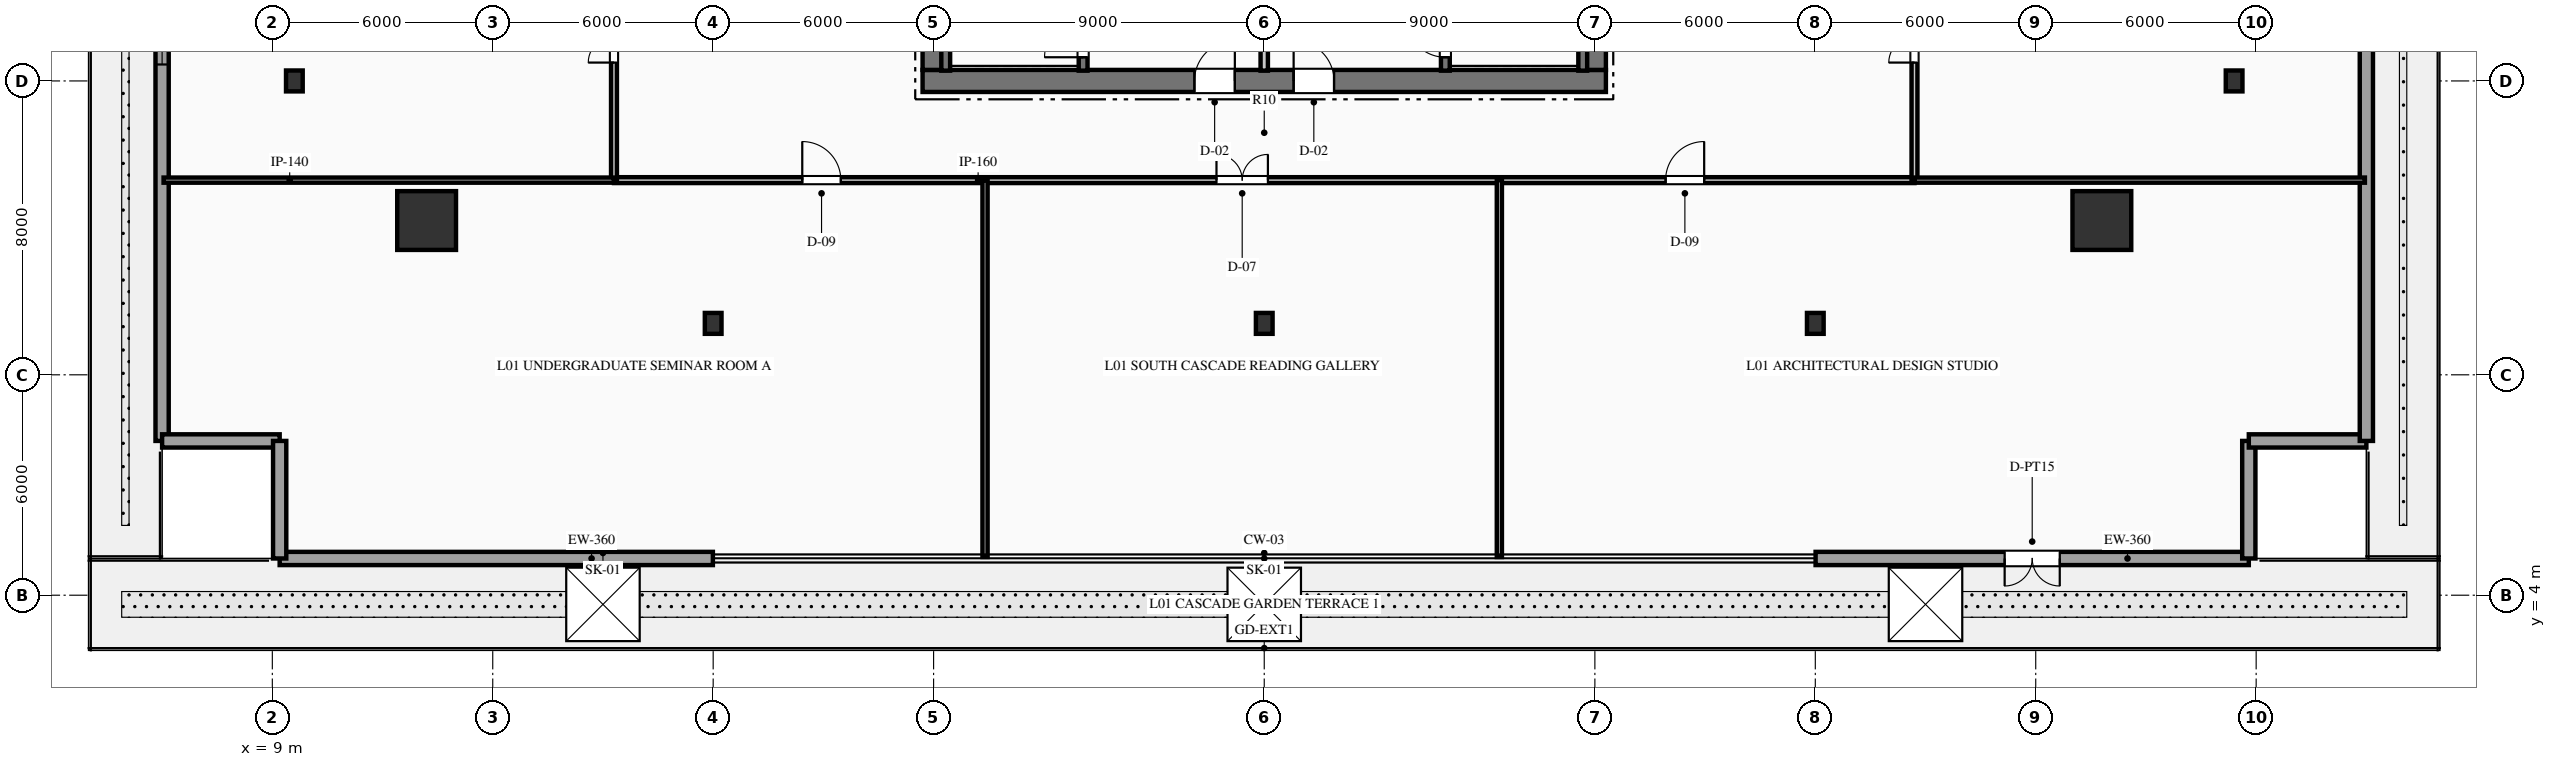
"""IFC4 building model, lengths in metres.
Left out: names, types, materials, properties, quantities, classifications, styles, units other than length and angle.
Written with IfcOpenShell. Run it as: python <this file> out.ifc"""

import sys

from ifc_helpers import new_model, si_unit, direction, frame, frame_2d, origin, origin_2d, place, context, subcontext, project, spatial, rectangle, hollow_rectangle, i_section, extrude, element, fill, save


model = new_model("IFC4")
c1 = context("Model", 3, precision=1e-05, world=origin(), true_north=direction((0.0, 1.0)))
c2 = subcontext(c1, "Body", "Model", "MODEL_VIEW")
j1 = project(units=[si_unit("LENGTHUNIT", "METRE"), si_unit("PLANEANGLEUNIT", "RADIAN")], contexts=[c1])
p1 = place(None, origin())
s1 = spatial("IfcSite", under=j1, at=p1, CompositionType="ELEMENT")
p2 = place(p1, origin())
s2 = spatial("IfcBuilding", under=s1, at=p2, CompositionType="ELEMENT")
p3 = place(p2, frame((0.0, 0.0, 6.0)))
s3 = spatial("IfcBuildingStorey", under=s2, at=p3, CompositionType="ELEMENT", Elevation=6.0)
p4 = place(p3, frame((26.7, 18.0, 0.0), z_axis=(0.0, 0.0, 1.0), x_axis=(1.0, 0.0, 0.0)))
e1 = element("IfcWall", 1, at=p4, inside=s3, PredefinedType="SHEAR", context=c2, shape_type="SweptSolid", body=[
    extrude(rectangle(XDim=18.6, YDim=0.6, at=frame_2d((9.3, 0.0))), origin(), (0.0, 0.0, 1.0), 5.4),
])
p5 = place(p4, frame((7.4, 0.0, 0.0)))
e2 = element("IfcOpeningElement", 2, at=p5, cuts=e1, PredefinedType="OPENING", context=c2, shape_type="SweptSolid", body=[
    extrude(rectangle(XDim=1.1, YDim=2.15, at=frame_2d((0.55, 1.075))), frame((0.0, 0.31, 0.0), z_axis=(0.0, -1.0, 0.0), x_axis=(1.0, 0.0, 0.0)), (0.0, 0.0, 1.0), 0.62),
])
p6 = place(p4, frame((10.1, 0.0, 0.0)))
e3 = element("IfcOpeningElement", 3, at=p6, cuts=e1, PredefinedType="OPENING", context=c2, shape_type="SweptSolid", body=[
    extrude(rectangle(XDim=1.1, YDim=2.15, at=frame_2d((0.55, 1.075))), frame((0.0, 0.31, 0.0), z_axis=(0.0, -1.0, 0.0), x_axis=(1.0, 0.0, 0.0)), (0.0, 0.0, 1.0), 0.62),
])
p7 = place(p3, frame((27.0, 18.3, 0.0), z_axis=(0.0, 0.0, 1.0), x_axis=(0.0, 1.0, 0.0)))
e4 = element("IfcWall", 4, at=p7, inside=s3, PredefinedType="SHEAR", context=c2, shape_type="SweptSolid", body=[
    extrude(rectangle(XDim=15.4, YDim=0.6, at=frame_2d((7.7, 0.0))), origin(), (0.0, 0.0, 1.0), 5.4),
])
p8 = place(p7, frame((9.94, 0.0, 0.0)))
e5 = element("IfcOpeningElement", 5, at=p8, cuts=e4, PredefinedType="OPENING", context=c2, shape_type="SweptSolid", body=[
    extrude(rectangle(XDim=1.4, YDim=2.2, at=frame_2d((0.7, 1.1))), frame((0.0, 0.31, 0.0), z_axis=(0.0, -1.0, 0.0), x_axis=(1.0, 0.0, 0.0)), (0.0, 0.0, 1.0), 0.62),
])
p9 = place(p3, frame((45.0, 18.3, 0.0), z_axis=(0.0, 0.0, 1.0), x_axis=(0.0, 1.0, 0.0)))
e6 = element("IfcWall", 6, at=p9, inside=s3, PredefinedType="SHEAR", context=c2, shape_type="SweptSolid", body=[
    extrude(rectangle(XDim=15.4, YDim=0.6, at=frame_2d((7.7, 0.0))), origin(), (0.0, 0.0, 1.0), 5.4),
])
p10 = place(p9, frame((9.94, 0.0, 0.0)))
e7 = element("IfcOpeningElement", 7, at=p10, cuts=e6, PredefinedType="OPENING", context=c2, shape_type="SweptSolid", body=[
    extrude(rectangle(XDim=1.4, YDim=2.2, at=frame_2d((0.7, 1.1))), frame((0.0, 0.31, 0.0), z_axis=(0.0, -1.0, 0.0), x_axis=(1.0, 0.0, 0.0)), (0.0, 0.0, 1.0), 0.62),
])
p11 = place(p3, frame((31.07, 18.28, 0.0), z_axis=(0.0, 0.0, 1.0), x_axis=(0.0, 1.0, 0.0)))
e8 = element("IfcWall", 8, at=p11, inside=s3, PredefinedType="SHEAR", context=c2, shape_type="SweptSolid", body=[
    extrude(rectangle(XDim=8.26, YDim=0.24, at=frame_2d((4.13, 0.0))), origin(), (0.0, 0.0, 1.0), 5.4),
])
p12 = place(p11, frame((0.365, 0.0, 0.0)))
e9 = element("IfcOpeningElement", 9, at=p12, cuts=e8, PredefinedType="OPENING", context=c2, shape_type="SweptSolid", body=[
    extrude(rectangle(XDim=1.05, YDim=2.15, at=frame_2d((0.525, 1.075))), frame((0.0, 0.13, 0.0), z_axis=(0.0, -1.0, 0.0), x_axis=(1.0, 0.0, 0.0)), (0.0, 0.0, 1.0), 0.26),
])
p13 = place(p3, frame((27.33, 18.28, 0.0), z_axis=(0.0, 0.0, 1.0), x_axis=(0.0, 1.0, 0.0)))
e10 = element("IfcWall", 10, at=p13, inside=s3, PredefinedType="SHEAR", context=c2, shape_type="SweptSolid", body=[
    extrude(rectangle(XDim=8.26, YDim=0.24, at=frame_2d((4.13, 0.0))), origin(), (0.0, 0.0, 1.0), 5.4),
])
p14 = place(p3, frame((40.93, 18.28, 0.0), z_axis=(0.0, 0.0, 1.0), x_axis=(0.0, 1.0, 0.0)))
e11 = element("IfcWall", 11, at=p14, inside=s3, PredefinedType="SHEAR", context=c2, shape_type="SweptSolid", body=[
    extrude(rectangle(XDim=8.26, YDim=0.24, at=frame_2d((4.13, 0.0))), origin(), (0.0, 0.0, 1.0), 5.4),
])
p15 = place(p14, frame((0.365, 0.0, 0.0)))
e12 = element("IfcOpeningElement", 12, at=p15, cuts=e11, PredefinedType="OPENING", context=c2, shape_type="SweptSolid", body=[
    extrude(rectangle(XDim=1.05, YDim=2.15, at=frame_2d((0.525, 1.075))), frame((0.0, 0.13, 0.0), z_axis=(0.0, -1.0, 0.0), x_axis=(1.0, 0.0, 0.0)), (0.0, 0.0, 1.0), 0.26),
])
p16 = place(p3, frame((44.67, 18.28, 0.0), z_axis=(0.0, 0.0, 1.0), x_axis=(0.0, 1.0, 0.0)))
e13 = element("IfcWall", 13, at=p16, inside=s3, PredefinedType="SHEAR", context=c2, shape_type="SweptSolid", body=[
    extrude(rectangle(XDim=8.26, YDim=0.24, at=frame_2d((4.13, 0.0))), origin(), (0.0, 0.0, 1.0), 5.4),
])
for number, where, z_axis, x_axis in (
    (14, (13.2, 14.2, 0.0), (0.0, 0.0, 1.0), (1.0, 0.0, 0.0)),
    (15, (58.8, 14.2, 0.0), (0.0, 0.0, 1.0), (1.0, 0.0, 0.0)),
):
    element("IfcColumn", number, at=place(p3, frame(where, z_axis=z_axis, x_axis=x_axis)), inside=s3, PredefinedType="COLUMN", context=c2, shape_type="SweptSolid", body=[
        extrude(hollow_rectangle(XDim=1.6, YDim=1.6, WallThickness=0.08, at=origin_2d()), origin(), (0.0, 0.0, 1.0), 5.4),
    ])
for number, where, z_axis, x_axis in (
    (16, (9.6, 18.0, 0.0), (0.0, 0.0, 1.0), (1.0, 0.0, 0.0)),
    (17, (62.4, 18.0, 0.0), (0.0, 0.0, 1.0), (1.0, 0.0, 0.0)),
    (18, (21.0, 11.4, 0.0), (0.0, 0.0, 1.0), (1.0, 0.0, 0.0)),
    (19, (51.0, 11.4, 0.0), (0.0, 0.0, 1.0), (1.0, 0.0, 0.0)),
    (20, (36.0, 11.4, 0.0), (0.0, 0.0, 1.0), (1.0, 0.0, 0.0)),
):
    element("IfcColumn", number, at=place(p3, frame(where, z_axis=z_axis, x_axis=x_axis)), inside=s3, PredefinedType="COLUMN", context=c2, shape_type="SweptSolid", body=[
        extrude(i_section(OverallWidth=0.454, OverallDepth=0.569, WebThickness=0.078, FlangeThickness=0.125, at=origin_2d()), origin(), (0.0, 0.0, 1.0), 5.4),
    ])
p17 = place(p3, frame((62.8, 5.0, 0.0), z_axis=(0.0, 0.0, 1.0), x_axis=(-1.0, 0.0, 0.0)))
e21 = element("IfcWall", 21, at=p17, inside=s3, PredefinedType="STANDARD", context=c2, shape_type="SweptSolid", body=[
    extrude(rectangle(XDim=11.792, YDim=0.36, at=frame_2d((5.896, 0.0))), origin(), (0.0, 0.0, 1.0), 5.07),
])
p18 = place(p17, frame((5.146, 0.0, 0.0)))
e22 = element("IfcOpeningElement", 22, at=p18, cuts=e21, PredefinedType="OPENING", context=c2, shape_type="SweptSolid", body=[
    extrude(rectangle(XDim=1.5, YDim=2.25, at=frame_2d((0.75, 1.125))), frame((0.0, 0.19, 0.0), z_axis=(0.0, -1.0, 0.0), x_axis=(1.0, 0.0, 0.0)), (0.0, 0.0, 1.0), 0.38),
])
p19 = place(p3, frame((20.992, 5.0, 0.0), z_axis=(0.0, 0.0, 1.0), x_axis=(-1.0, 0.0, 0.0)))
e23 = element("IfcWall", 23, at=p19, inside=s3, PredefinedType="STANDARD", context=c2, shape_type="SweptSolid", body=[
    extrude(rectangle(XDim=11.792, YDim=0.36, at=frame_2d((5.896, 0.0))), origin(), (0.0, 0.0, 1.0), 5.07),
])
for number, where, z_axis, x_axis in (
    (24, (62.8, 8.2, 0.0), (0.0, 0.0, 1.0), (0.0, -1.0, 0.0)),
    (25, (66.0, 8.2, 0.0), (0.0, 0.0, 1.0), (-1.0, 0.0, 0.0)),
):
    element("IfcWall", number, at=place(p3, frame(where, z_axis=z_axis, x_axis=x_axis)), inside=s3, PredefinedType="STANDARD", context=c2, shape_type="SweptSolid", body=[
        extrude(rectangle(XDim=3.2, YDim=0.36, at=frame_2d((1.6, 0.0))), origin(), (0.0, 0.0, 1.0), 5.07),
    ])
p20 = place(p3, frame((66.0, 44.8, 0.0), z_axis=(0.0, 0.0, 1.0), x_axis=(0.0, -1.0, 0.0)))
e26 = element("IfcWall", 26, at=p20, inside=s3, PredefinedType="STANDARD", context=c2, shape_type="SweptSolid", body=[
    extrude(rectangle(XDim=36.6, YDim=0.36, at=frame_2d((18.3, 0.0))), origin(), (0.0, 0.0, 1.0), 5.07),
])
p21 = place(p20, frame((18.05, 0.0, 0.0)))
e27 = element("IfcOpeningElement", 27, at=p21, cuts=e26, PredefinedType="OPENING", context=c2, shape_type="SweptSolid", body=[
    extrude(rectangle(XDim=1.5, YDim=2.25, at=frame_2d((0.75, 1.125))), frame((0.0, 0.19, 0.0), z_axis=(0.0, -1.0, 0.0), x_axis=(1.0, 0.0, 0.0)), (0.0, 0.0, 1.0), 0.38),
])
p22 = place(p20, frame((10.248, 0.0, 1.0)))
e28 = element("IfcOpeningElement", 28, at=p22, cuts=e26, PredefinedType="OPENING", context=c2, shape_type="SweptSolid", body=[
    extrude(rectangle(XDim=1.4, YDim=2.2, at=frame_2d((0.7, 1.1))), frame((0.0, 0.19, 0.0), z_axis=(0.0, -1.0, 0.0), x_axis=(1.0, 0.0, 0.0)), (0.0, 0.0, 1.0), 0.38),
])
p23 = place(p3, frame((6.0, 8.2, 0.0), z_axis=(0.0, 0.0, 1.0), x_axis=(0.0, 1.0, 0.0)))
e29 = element("IfcWall", 29, at=p23, inside=s3, PredefinedType="STANDARD", context=c2, shape_type="SweptSolid", body=[
    extrude(rectangle(XDim=36.6, YDim=0.36, at=frame_2d((18.3, 0.0))), origin(), (0.0, 0.0, 1.0), 5.07),
])
p24 = place(p23, frame((17.05, 0.0, 0.0)))
e30 = element("IfcOpeningElement", 30, at=p24, cuts=e29, PredefinedType="OPENING", context=c2, shape_type="SweptSolid", body=[
    extrude(rectangle(XDim=1.5, YDim=2.25, at=frame_2d((0.75, 1.125))), frame((0.0, 0.19, 0.0), z_axis=(0.0, -1.0, 0.0), x_axis=(1.0, 0.0, 0.0)), (0.0, 0.0, 1.0), 0.38),
])
p25 = place(p23, frame((10.248, 0.0, 1.0)))
e31 = element("IfcOpeningElement", 31, at=p25, cuts=e29, PredefinedType="OPENING", context=c2, shape_type="SweptSolid", body=[
    extrude(rectangle(XDim=1.4, YDim=2.2, at=frame_2d((0.7, 1.1))), frame((0.0, 0.19, 0.0), z_axis=(0.0, -1.0, 0.0), x_axis=(1.0, 0.0, 0.0)), (0.0, 0.0, 1.0), 0.38),
])
for number, where, z_axis, x_axis in (
    (32, (9.2, 8.2, 0.0), (0.0, 0.0, 1.0), (-1.0, 0.0, 0.0)),
    (33, (9.2, 5.0, 0.0), (0.0, 0.0, 1.0), (0.0, 1.0, 0.0)),
):
    element("IfcWall", number, at=place(p3, frame(where, z_axis=z_axis, x_axis=x_axis)), inside=s3, PredefinedType="STANDARD", context=c2, shape_type="SweptSolid", body=[
        extrude(rectangle(XDim=3.2, YDim=0.36, at=frame_2d((1.6, 0.0))), origin(), (0.0, 0.0, 1.0), 5.07),
    ])
p26 = place(p3, frame((36.0, 18.28, 0.0), z_axis=(0.0, 0.0, 1.0), x_axis=(0.0, 1.0, 0.0)))
e34 = element("IfcWall", 34, at=p26, inside=s3, PredefinedType="PARTITIONING", context=c2, shape_type="SweptSolid", body=[
    extrude(rectangle(XDim=3.77, YDim=0.2, at=frame_2d((1.885, 0.0))), origin(), (0.0, 0.0, 1.0), 5.07),
])
p27 = place(p3, frame((18.3, 15.3, 0.0), z_axis=(0.0, 0.0, 1.0), x_axis=(1.0, 0.0, 0.0)))
e35 = element("IfcWall", 35, at=p27, inside=s3, PredefinedType="PARTITIONING", context=c2, shape_type="SweptSolid", body=[
    extrude(rectangle(XDim=35.4, YDim=0.16, at=frame_2d((17.7, 0.0))), origin(), (0.0, 0.0, 1.0), 4.292),
])
p28 = place(p27, frame((5.125, 0.0, 0.0)))
e36 = element("IfcOpeningElement", 36, at=p28, cuts=e35, PredefinedType="OPENING", context=c2, shape_type="SweptSolid", body=[
    extrude(rectangle(XDim=1.05, YDim=2.15, at=frame_2d((0.525, 1.075))), frame((0.0, 0.09, 0.0), z_axis=(0.0, -1.0, 0.0), x_axis=(1.0, 0.0, 0.0)), (0.0, 0.0, 1.0), 0.18),
])
p29 = place(p27, frame((16.4, 0.0, 0.0)))
e37 = element("IfcOpeningElement", 37, at=p29, cuts=e35, PredefinedType="OPENING", context=c2, shape_type="SweptSolid", body=[
    extrude(rectangle(XDim=1.4, YDim=2.2, at=frame_2d((0.7, 1.1))), frame((0.0, 0.09, 0.0), z_axis=(0.0, -1.0, 0.0), x_axis=(1.0, 0.0, 0.0)), (0.0, 0.0, 1.0), 0.18),
])
p30 = place(p27, frame((28.625, 0.0, 0.0)))
e38 = element("IfcOpeningElement", 38, at=p30, cuts=e35, PredefinedType="OPENING", context=c2, shape_type="SweptSolid", body=[
    extrude(rectangle(XDim=1.05, YDim=2.15, at=frame_2d((0.525, 1.075))), frame((0.0, 0.09, 0.0), z_axis=(0.0, -1.0, 0.0), x_axis=(1.0, 0.0, 0.0)), (0.0, 0.0, 1.0), 0.18),
])
p31 = place(p3, frame((18.3, 15.3, 0.0), z_axis=(0.0, 0.0, 1.0), x_axis=(0.0, 1.0, 0.0)))
e39 = element("IfcWall", 39, at=p31, inside=s3, PredefinedType="PARTITIONING", context=c2, shape_type="SweptSolid", body=[
    extrude(rectangle(XDim=6.55, YDim=0.16, at=frame_2d((3.275, 0.0))), origin(), (0.0, 0.0, 1.0), 5.07),
])
p32 = place(p31, frame((3.2, 0.0, 0.0)))
e40 = element("IfcOpeningElement", 40, at=p32, cuts=e39, PredefinedType="OPENING", context=c2, shape_type="SweptSolid", body=[
    extrude(rectangle(XDim=1.4, YDim=2.2, at=frame_2d((0.7, 1.1))), frame((0.0, 0.09, 0.0), z_axis=(0.0, -1.0, 0.0), x_axis=(1.0, 0.0, 0.0)), (0.0, 0.0, 1.0), 0.18),
])
p33 = place(p3, frame((53.7, 15.3, 0.0), z_axis=(0.0, 0.0, 1.0), x_axis=(0.0, 1.0, 0.0)))
e41 = element("IfcWall", 41, at=p33, inside=s3, PredefinedType="PARTITIONING", context=c2, shape_type="SweptSolid", body=[
    extrude(rectangle(XDim=6.55, YDim=0.16, at=frame_2d((3.275, 0.0))), origin(), (0.0, 0.0, 1.0), 5.07),
])
p34 = place(p33, frame((3.2, 0.0, 0.0)))
e42 = element("IfcOpeningElement", 42, at=p34, cuts=e41, PredefinedType="OPENING", context=c2, shape_type="SweptSolid", body=[
    extrude(rectangle(XDim=1.4, YDim=2.2, at=frame_2d((0.7, 1.1))), frame((0.0, 0.09, 0.0), z_axis=(0.0, -1.0, 0.0), x_axis=(1.0, 0.0, 0.0)), (0.0, 0.0, 1.0), 0.18),
])
for number, where, z_axis, x_axis in (
    (43, (6.04, 15.3, 0.0), (0.0, 0.0, 1.0), (1.0, 0.0, 0.0)),
    (44, (53.7, 15.3, 0.0), (0.0, 0.0, 1.0), (1.0, 0.0, 0.0)),
):
    element("IfcWall", number, at=place(p3, frame(where, z_axis=z_axis, x_axis=x_axis)), inside=s3, PredefinedType="PARTITIONING", context=c2, shape_type="SweptSolid", body=[
        extrude(rectangle(XDim=12.26, YDim=0.14, at=frame_2d((6.13, 0.0))), origin(), (0.0, 0.0, 1.0), 4.292),
    ])
for number, where, z_axis, x_axis in (
    (45, (28.4, 5.04, 0.0), (0.0, 0.0, 1.0), (0.0, 1.0, 0.0)),
    (46, (42.4, 5.04, 0.0), (0.0, 0.0, 1.0), (0.0, 1.0, 0.0)),
):
    element("IfcWall", number, at=place(p3, frame(where, z_axis=z_axis, x_axis=x_axis)), inside=s3, PredefinedType="PARTITIONING", context=c2, shape_type="SweptSolid", body=[
        extrude(rectangle(XDim=10.26, YDim=0.14, at=frame_2d((5.13, 0.0))), origin(), (0.0, 0.0, 1.0), 5.07),
    ])
p35 = place(p18, origin())
e47 = element("IfcDoor", 47, at=p35, inside=s3, OperationType="DOUBLE_DOOR_SINGLE_SWING", PredefinedType="DOOR", context=c2, shape_type="SweptSolid", body=[
    extrude(rectangle(XDim=1.5, YDim=2.25, at=frame_2d((0.75, 1.125))), frame((0.0, 0.025, 0.0), z_axis=(0.0, -1.0, 0.0), x_axis=(1.0, 0.0, 0.0)), (0.0, 0.0, 1.0), 0.05),
])
fill(e22, e47)
p36 = place(p25, origin())
e48 = element("IfcWindow", 48, at=p36, inside=s3, PartitioningType="SINGLE_PANEL", PredefinedType="WINDOW", context=c2, shape_type="SweptSolid", body=[
    extrude(rectangle(XDim=1.4, YDim=2.2, at=frame_2d((0.7, 1.1))), frame((0.0, 0.03, 0.0), z_axis=(0.0, -1.0, 0.0), x_axis=(1.0, 0.0, 0.0)), (0.0, 0.0, 1.0), 0.06),
])
fill(e31, e48)
p37 = place(p3, frame((0.0, 0.0, -0.25)))
p38 = place(p37, frame((18.0, 3.75, 0.2)))
e49 = element("IfcWindow", 49, at=p38, inside=s3, PartitioningType="SINGLE_PANEL", PredefinedType="SKYLIGHT", context=c2, shape_type="SweptSolid", body=[
    extrude(rectangle(XDim=2.0, YDim=2.0, at=origin_2d()), origin(), (0.0, 0.0, 1.0), 0.05),
])
p39 = place(p37, frame((36.0, 3.75, 0.2)))
e50 = element("IfcWindow", 50, at=p39, inside=s3, PartitioningType="SINGLE_PANEL", PredefinedType="SKYLIGHT", context=c2, shape_type="SweptSolid", body=[
    extrude(rectangle(XDim=2.0, YDim=2.0, at=origin_2d()), origin(), (0.0, 0.0, 1.0), 0.05),
])
p40 = place(p37, frame((54.0, 3.75, 0.2)))
e51 = element("IfcWindow", 51, at=p40, inside=s3, PartitioningType="SINGLE_PANEL", PredefinedType="SKYLIGHT", context=c2, shape_type="SweptSolid", body=[
    extrude(rectangle(XDim=2.0, YDim=2.0, at=origin_2d()), origin(), (0.0, 0.0, 1.0), 0.05),
])
p41 = place(p12, origin())
e52 = element("IfcDoor", 52, at=p41, inside=s3, OperationType="SINGLE_SWING_LEFT", PredefinedType="DOOR", context=c2, shape_type="SweptSolid", body=[
    extrude(rectangle(XDim=1.05, YDim=2.15, at=frame_2d((0.525, 1.075))), frame((0.0, 0.025, 0.0), z_axis=(0.0, -1.0, 0.0), x_axis=(1.0, 0.0, 0.0)), (0.0, 0.0, 1.0), 0.05),
])
fill(e9, e52)
p42 = place(p15, origin())
e53 = element("IfcDoor", 53, at=p42, inside=s3, OperationType="SINGLE_SWING_RIGHT", PredefinedType="DOOR", context=c2, shape_type="SweptSolid", body=[
    extrude(rectangle(XDim=1.05, YDim=2.15, at=frame_2d((0.525, 1.075))), frame((0.0, 0.025, 0.0), z_axis=(0.0, -1.0, 0.0), x_axis=(1.0, 0.0, 0.0)), (0.0, 0.0, 1.0), 0.05),
])
fill(e12, e53)
p43 = place(p5, origin())
e54 = element("IfcDoor", 54, at=p43, inside=s3, OperationType="SINGLE_SWING_RIGHT", PredefinedType="DOOR", context=c2, shape_type="SweptSolid", body=[
    extrude(rectangle(XDim=1.1, YDim=2.15, at=frame_2d((0.55, 1.075))), frame((0.0, 0.025, 0.0), z_axis=(0.0, -1.0, 0.0), x_axis=(1.0, 0.0, 0.0)), (0.0, 0.0, 1.0), 0.05),
])
fill(e2, e54)
p44 = place(p6, origin())
e55 = element("IfcDoor", 55, at=p44, inside=s3, OperationType="SINGLE_SWING_LEFT", PredefinedType="DOOR", context=c2, shape_type="SweptSolid", body=[
    extrude(rectangle(XDim=1.1, YDim=2.15, at=frame_2d((0.55, 1.075))), frame((0.0, 0.025, 0.0), z_axis=(0.0, -1.0, 0.0), x_axis=(1.0, 0.0, 0.0)), (0.0, 0.0, 1.0), 0.05),
])
fill(e3, e55)
p45 = place(p28, origin())
e56 = element("IfcDoor", 56, at=p45, inside=s3, OperationType="SINGLE_SWING_LEFT", PredefinedType="DOOR", context=c2, shape_type="SweptSolid", body=[
    extrude(rectangle(XDim=1.05, YDim=2.15, at=frame_2d((0.525, 1.075))), frame((0.0, 0.025, 0.0), z_axis=(0.0, -1.0, 0.0), x_axis=(1.0, 0.0, 0.0)), (0.0, 0.0, 1.0), 0.05),
])
fill(e36, e56)
p46 = place(p29, origin())
e57 = element("IfcDoor", 57, at=p46, inside=s3, OperationType="DOUBLE_DOOR_SINGLE_SWING", PredefinedType="DOOR", context=c2, shape_type="SweptSolid", body=[
    extrude(rectangle(XDim=1.4, YDim=2.2, at=frame_2d((0.7, 1.1))), frame((0.0, 0.025, 0.0), z_axis=(0.0, -1.0, 0.0), x_axis=(1.0, 0.0, 0.0)), (0.0, 0.0, 1.0), 0.05),
])
fill(e37, e57)
p47 = place(p30, origin())
e58 = element("IfcDoor", 58, at=p47, inside=s3, OperationType="SINGLE_SWING_RIGHT", PredefinedType="DOOR", context=c2, shape_type="SweptSolid", body=[
    extrude(rectangle(XDim=1.05, YDim=2.15, at=frame_2d((0.525, 1.075))), frame((0.0, 0.025, 0.0), z_axis=(0.0, -1.0, 0.0), x_axis=(1.0, 0.0, 0.0)), (0.0, 0.0, 1.0), 0.05),
])
fill(e38, e58)
p48 = place(p32, origin())
e59 = element("IfcDoor", 59, at=p48, inside=s3, OperationType="DOUBLE_DOOR_SINGLE_SWING", PredefinedType="DOOR", context=c2, shape_type="SweptSolid", body=[
    extrude(rectangle(XDim=1.4, YDim=2.2, at=frame_2d((0.7, 1.1))), frame((0.0, 0.025, 0.0), z_axis=(0.0, -1.0, 0.0), x_axis=(1.0, 0.0, 0.0)), (0.0, 0.0, 1.0), 0.05),
])
fill(e40, e59)
p49 = place(p34, origin())
e60 = element("IfcDoor", 60, at=p49, inside=s3, OperationType="DOUBLE_DOOR_SINGLE_SWING", PredefinedType="DOOR", context=c2, shape_type="SweptSolid", body=[
    extrude(rectangle(XDim=1.4, YDim=2.2, at=frame_2d((0.7, 1.1))), frame((0.0, 0.025, 0.0), z_axis=(0.0, -1.0, 0.0), x_axis=(1.0, 0.0, 0.0)), (0.0, 0.0, 1.0), 0.05),
])
fill(e42, e60)
save(model, sys.argv[1])
